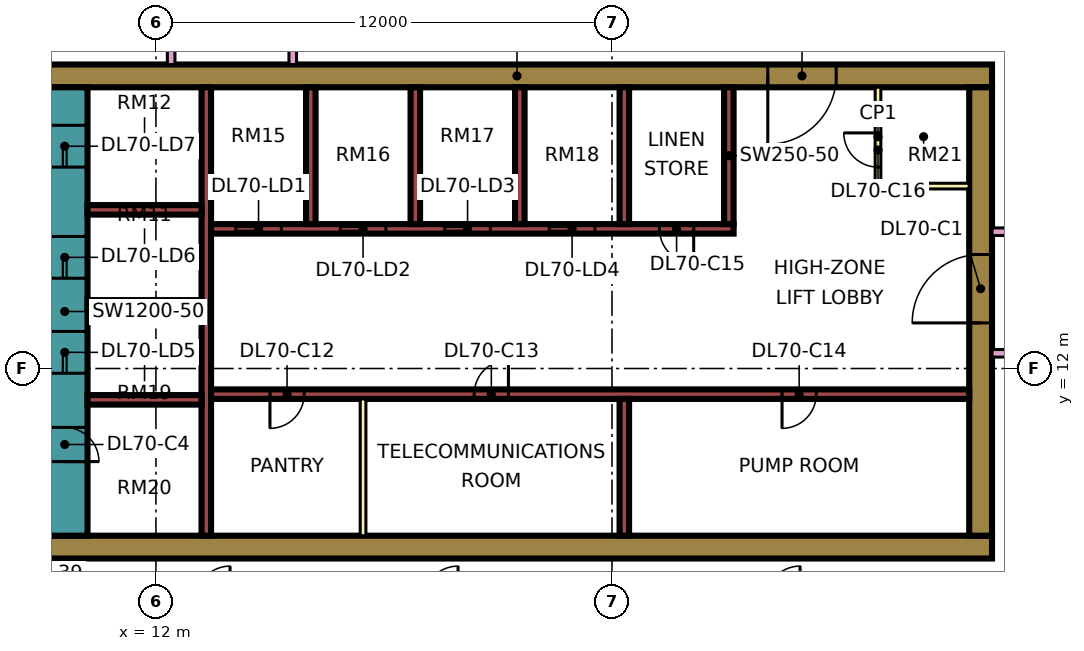
"""IFC4 building model, lengths in metres.
Left out: names, types, materials, properties, quantities, classifications, styles, units other than length and angle.
Written with IfcOpenShell. Run it as: python <this file> out.ifc"""

import sys

from ifc_helpers import new_model, si_unit, direction, frame, frame_2d, origin, place, context, subcontext, project, spatial, rectangle, extrude, element, fill, save


model = new_model("IFC4")
c1 = context("Model", 3, precision=1e-05, world=origin(), true_north=direction((0.0, 1.0)))
c2 = subcontext(c1, "Body", "Model", "MODEL_VIEW")
j1 = project(units=[si_unit("LENGTHUNIT", "METRE"), si_unit("PLANEANGLEUNIT", "RADIAN")], contexts=[c1])
p1 = place(None, origin())
s1 = spatial("IfcSite", under=j1, at=p1, CompositionType="ELEMENT")
p2 = place(p1, origin())
s2 = spatial("IfcBuilding", under=s1, at=p2, CompositionType="ELEMENT")
p3 = place(p2, frame((0.0, 0.0, 299.65)))
s3 = spatial("IfcBuildingStorey", under=s2, at=p3, CompositionType="ELEMENT", Elevation=299.65)
p4 = place(p3, frame((9.0, 7.3, 0.0), z_axis=(0.0, 0.0, 1.0), x_axis=(1.0, 0.0, 0.0)))
e1 = element("IfcWall", 1, at=p4, inside=s3, PredefinedType="SHEAR", context=c2, shape_type="SweptSolid", body=[
    extrude(rectangle(XDim=25.0, YDim=0.6, at=frame_2d((12.5, 0.0))), origin(), (0.0, 0.0, 1.0), 3.75),
])
p5 = place(p3, frame((9.0, 19.7, 0.0), z_axis=(0.0, 0.0, 1.0), x_axis=(1.0, 0.0, 0.0)))
e2 = element("IfcWall", 2, at=p5, inside=s3, PredefinedType="SHEAR", context=c2, shape_type="SweptSolid", body=[
    extrude(rectangle(XDim=25.0, YDim=0.6, at=frame_2d((12.5, 0.0))), origin(), (0.0, 0.0, 1.0), 3.75),
])
p6 = place(p5, frame((19.1, 0.0, 0.0)))
e3 = element("IfcOpeningElement", 3, at=p6, cuts=e2, PredefinedType="OPENING", context=c2, shape_type="SweptSolid", body=[
    extrude(rectangle(XDim=1.8, YDim=2.4, at=frame_2d((0.9, 1.2))), frame((0.0, 0.31, 0.0), z_axis=(0.0, -1.0, 0.0), x_axis=(1.0, 0.0, 0.0)), (0.0, 0.0, 1.0), 0.62),
])
p7 = place(p3, frame((9.6, 7.6, 0.0), z_axis=(0.0, 0.0, 1.0), x_axis=(0.0, 1.0, 0.0)))
e4 = element("IfcWall", 4, at=p7, inside=s3, PredefinedType="SHEAR", context=c2, shape_type="SweptSolid", body=[
    extrude(rectangle(XDim=11.8, YDim=1.2, at=frame_2d((5.9, 0.0))), origin(), (0.0, 0.0, 1.0), 3.75),
])
p8 = place(p7, frame((4.275, 0.0, 0.0)))
e5 = element("IfcOpeningElement", 5, at=p8, cuts=e4, PredefinedType="OPENING", context=c2, shape_type="SweptSolid", body=[
    extrude(rectangle(XDim=1.1, YDim=2.2, at=frame_2d((0.55, 1.1))), frame((0.0, 0.61, 0.0), z_axis=(0.0, -1.0, 0.0), x_axis=(1.0, 0.0, 0.0)), (0.0, 0.0, 1.0), 1.22),
])
p9 = place(p7, frame((6.775, 0.0, 0.0)))
e6 = element("IfcOpeningElement", 6, at=p9, cuts=e4, PredefinedType="OPENING", context=c2, shape_type="SweptSolid", body=[
    extrude(rectangle(XDim=1.1, YDim=2.2, at=frame_2d((0.55, 1.1))), frame((0.0, 0.61, 0.0), z_axis=(0.0, -1.0, 0.0), x_axis=(1.0, 0.0, 0.0)), (0.0, 0.0, 1.0), 1.22),
])
p10 = place(p7, frame((9.7, 0.0, 0.0)))
e7 = element("IfcOpeningElement", 7, at=p10, cuts=e4, PredefinedType="OPENING", context=c2, shape_type="SweptSolid", body=[
    extrude(rectangle(XDim=1.1, YDim=2.2, at=frame_2d((0.55, 1.1))), frame((0.0, 0.61, 0.0), z_axis=(0.0, -1.0, 0.0), x_axis=(1.0, 0.0, 0.0)), (0.0, 0.0, 1.0), 1.22),
])
p11 = place(p7, frame((1.95, 0.0, 0.0)))
e8 = element("IfcOpeningElement", 8, at=p11, cuts=e4, PredefinedType="OPENING", context=c2, shape_type="SweptSolid", body=[
    extrude(rectangle(XDim=0.9, YDim=2.1, at=frame_2d((0.45, 1.05))), frame((0.0, 0.61, 0.0), z_axis=(0.0, -1.0, 0.0), x_axis=(1.0, 0.0, 0.0)), (0.0, 0.0, 1.0), 1.22),
])
p12 = place(p3, frame((33.7, 7.6, 0.0), z_axis=(0.0, 0.0, 1.0), x_axis=(0.0, 1.0, 0.0)))
e9 = element("IfcWall", 9, at=p12, inside=s3, PredefinedType="SHEAR", context=c2, shape_type="SweptSolid", body=[
    extrude(rectangle(XDim=11.8, YDim=0.6, at=frame_2d((5.9, 0.0))), origin(), (0.0, 0.0, 1.0), 3.75),
])
p13 = place(p12, frame((5.6, 0.0, 0.0)))
e10 = element("IfcOpeningElement", 10, at=p13, cuts=e9, PredefinedType="OPENING", context=c2, shape_type="SweptSolid", body=[
    extrude(rectangle(XDim=1.8, YDim=2.4, at=frame_2d((0.9, 1.2))), frame((0.0, 0.31, 0.0), z_axis=(0.0, -1.0, 0.0), x_axis=(1.0, 0.0, 0.0)), (0.0, 0.0, 1.0), 0.62),
])
p14 = place(p3, frame((13.325, 7.6, 0.0), z_axis=(0.0, 0.0, 1.0), x_axis=(0.0, 1.0, 0.0)))
e11 = element("IfcWall", 11, at=p14, inside=s3, PredefinedType="SHEAR", context=c2, shape_type="SweptSolid", body=[
    extrude(rectangle(XDim=11.8, YDim=0.25, at=frame_2d((5.9, 0.0))), origin(), (0.0, 0.0, 1.0), 3.75),
])
p15 = place(p3, frame((13.45, 11.325, 0.0), z_axis=(0.0, 0.0, 1.0), x_axis=(1.0, 0.0, 0.0)))
e12 = element("IfcWall", 12, at=p15, inside=s3, PredefinedType="SHEAR", context=c2, shape_type="SweptSolid", body=[
    extrude(rectangle(XDim=19.95, YDim=0.25, at=frame_2d((9.975, 0.0))), origin(), (0.0, 0.0, 1.0), 3.75),
])
p16 = place(p15, frame((1.55, 0.0, 0.0)))
e13 = element("IfcOpeningElement", 13, at=p16, cuts=e12, PredefinedType="OPENING", context=c2, shape_type="SweptSolid", body=[
    extrude(rectangle(XDim=0.9, YDim=2.1, at=frame_2d((0.45, 1.05))), frame((0.0, 0.135, 0.0), z_axis=(0.0, -1.0, 0.0), x_axis=(1.0, 0.0, 0.0)), (0.0, 0.0, 1.0), 0.27),
])
p17 = place(p15, frame((6.925, 0.0, 0.0)))
e14 = element("IfcOpeningElement", 14, at=p17, cuts=e12, PredefinedType="OPENING", context=c2, shape_type="SweptSolid", body=[
    extrude(rectangle(XDim=0.9, YDim=2.1, at=frame_2d((0.45, 1.05))), frame((0.0, 0.135, 0.0), z_axis=(0.0, -1.0, 0.0), x_axis=(1.0, 0.0, 0.0)), (0.0, 0.0, 1.0), 0.27),
])
p18 = place(p15, frame((15.025, 0.0, 0.0)))
e15 = element("IfcOpeningElement", 15, at=p18, cuts=e12, PredefinedType="OPENING", context=c2, shape_type="SweptSolid", body=[
    extrude(rectangle(XDim=0.9, YDim=2.1, at=frame_2d((0.45, 1.05))), frame((0.0, 0.135, 0.0), z_axis=(0.0, -1.0, 0.0), x_axis=(1.0, 0.0, 0.0)), (0.0, 0.0, 1.0), 0.27),
])
p19 = place(p3, frame((13.45, 15.675, 0.0), z_axis=(0.0, 0.0, 1.0), x_axis=(1.0, 0.0, 0.0)))
e16 = element("IfcWall", 16, at=p19, inside=s3, PredefinedType="SHEAR", context=c2, shape_type="SweptSolid", body=[
    extrude(rectangle(XDim=13.75, YDim=0.25, at=frame_2d((6.875, 0.0))), origin(), (0.0, 0.0, 1.0), 3.75),
])
p20 = place(p19, frame((0.65, 0.0, 0.0)))
e17 = element("IfcOpeningElement", 17, at=p20, cuts=e16, PredefinedType="OPENING", context=c2, shape_type="SweptSolid", body=[
    extrude(rectangle(XDim=1.2, YDim=2.2, at=frame_2d((0.6, 1.1))), frame((0.0, 0.135, 0.0), z_axis=(0.0, -1.0, 0.0), x_axis=(1.0, 0.0, 0.0)), (0.0, 0.0, 1.0), 0.27),
])
p21 = place(p19, frame((3.4, 0.0, 0.0)))
e18 = element("IfcOpeningElement", 18, at=p21, cuts=e16, PredefinedType="OPENING", context=c2, shape_type="SweptSolid", body=[
    extrude(rectangle(XDim=1.2, YDim=2.2, at=frame_2d((0.6, 1.1))), frame((0.0, 0.135, 0.0), z_axis=(0.0, -1.0, 0.0), x_axis=(1.0, 0.0, 0.0)), (0.0, 0.0, 1.0), 0.27),
])
p22 = place(p19, frame((6.15, 0.0, 0.0)))
e19 = element("IfcOpeningElement", 19, at=p22, cuts=e16, PredefinedType="OPENING", context=c2, shape_type="SweptSolid", body=[
    extrude(rectangle(XDim=1.2, YDim=2.2, at=frame_2d((0.6, 1.1))), frame((0.0, 0.135, 0.0), z_axis=(0.0, -1.0, 0.0), x_axis=(1.0, 0.0, 0.0)), (0.0, 0.0, 1.0), 0.27),
])
p23 = place(p19, frame((8.9, 0.0, 0.0)))
e20 = element("IfcOpeningElement", 20, at=p23, cuts=e16, PredefinedType="OPENING", context=c2, shape_type="SweptSolid", body=[
    extrude(rectangle(XDim=1.2, YDim=2.2, at=frame_2d((0.6, 1.1))), frame((0.0, 0.135, 0.0), z_axis=(0.0, -1.0, 0.0), x_axis=(1.0, 0.0, 0.0)), (0.0, 0.0, 1.0), 0.27),
])
p24 = place(p19, frame((11.8, 0.0, 0.0)))
e21 = element("IfcOpeningElement", 21, at=p24, cuts=e16, PredefinedType="OPENING", context=c2, shape_type="SweptSolid", body=[
    extrude(rectangle(XDim=0.9, YDim=2.1, at=frame_2d((0.45, 1.05))), frame((0.0, 0.135, 0.0), z_axis=(0.0, -1.0, 0.0), x_axis=(1.0, 0.0, 0.0)), (0.0, 0.0, 1.0), 0.27),
])
for number, where, z_axis, x_axis in (
    (22, (10.2, 11.175, 0.0), (0.0, 0.0, 1.0), (1.0, 0.0, 0.0)),
    (23, (10.2, 13.675, 0.0), (0.0, 0.0, 1.0), (1.0, 0.0, 0.0)),
    (24, (10.2, 16.175, 0.0), (0.0, 0.0, 1.0), (1.0, 0.0, 0.0)),
):
    element("IfcWall", number, at=place(p3, frame(where, z_axis=z_axis, x_axis=x_axis)), inside=s3, PredefinedType="SHEAR", context=c2, shape_type="SweptSolid", body=[
        extrude(rectangle(XDim=3.0, YDim=0.25, at=frame_2d((1.5, 0.0))), origin(), (0.0, 0.0, 1.0), 3.75),
    ])
for number, where, z_axis, x_axis in (
    (25, (24.325, 7.6, 0.0), (0.0, 0.0, 1.0), (0.0, 1.0, 0.0)),
    (26, (16.075, 15.8, 0.0), (0.0, 0.0, 1.0), (0.0, 1.0, 0.0)),
    (27, (18.825, 15.8, 0.0), (0.0, 0.0, 1.0), (0.0, 1.0, 0.0)),
    (28, (21.575, 15.8, 0.0), (0.0, 0.0, 1.0), (0.0, 1.0, 0.0)),
    (29, (24.325, 15.8, 0.0), (0.0, 0.0, 1.0), (0.0, 1.0, 0.0)),
    (30, (27.075, 15.8, 0.0), (0.0, 0.0, 1.0), (0.0, 1.0, 0.0)),
):
    element("IfcWall", number, at=place(p3, frame(where, z_axis=z_axis, x_axis=x_axis)), inside=s3, PredefinedType="SHEAR", context=c2, shape_type="SweptSolid", body=[
        extrude(rectangle(XDim=3.6, YDim=0.25, at=frame_2d((1.8, 0.0))), origin(), (0.0, 0.0, 1.0), 3.75),
    ])
p25 = place(p3, frame((-1.447, 12.553, 0.0), z_axis=(0.0, 0.0, 1.0), x_axis=(0.707106781187, -0.707106781187, 0.0)))
e31 = element("IfcWall", 31, at=p25, inside=s3, PredefinedType="SOLIDWALL", context=c2, shape_type="SweptSolid", body=[
    extrude(rectangle(XDim=19.799, YDim=0.15, at=frame_2d((9.899, 0.0))), origin(), (0.0, 0.0, 1.0), 3.35),
])
p26 = place(p25, frame((2.212, 0.0, 0.45)))
e32 = element("IfcOpeningElement", 32, at=p26, cuts=e31, PredefinedType="OPENING", context=c2, shape_type="SweptSolid", body=[
    extrude(rectangle(XDim=3.0, YDim=2.4, at=frame_2d((1.5, 1.2))), frame((0.0, 0.085, 0.0), z_axis=(0.0, -1.0, 0.0), x_axis=(1.0, 0.0, 0.0)), (0.0, 0.0, 1.0), 0.17),
])
p27 = place(p25, frame((10.216, 0.0, 0.45)))
e33 = element("IfcOpeningElement", 33, at=p27, cuts=e31, PredefinedType="OPENING", context=c2, shape_type="SweptSolid", body=[
    extrude(rectangle(XDim=3.0, YDim=2.4, at=frame_2d((1.5, 1.2))), frame((0.0, 0.085, 0.0), z_axis=(0.0, -1.0, 0.0), x_axis=(1.0, 0.0, 0.0)), (0.0, 0.0, 1.0), 0.17),
])
p28 = place(p3, frame((17.45, 7.6, 0.0), z_axis=(0.0, 0.0, 1.0), x_axis=(0.0, 1.0, 0.0)))
e34 = element("IfcWall", 34, at=p28, inside=s3, PredefinedType="PARTITIONING", context=c2, shape_type="SweptSolid", body=[
    extrude(rectangle(XDim=3.6, YDim=0.15, at=frame_2d((1.8, 0.0))), origin(), (0.0, 0.0, 1.0), 3.35),
])
p29 = place(p3, frame((31.0, 16.8, 0.0), z_axis=(0.0, 0.0, 1.0), x_axis=(0.0, 1.0, 0.0)))
e35 = element("IfcWall", 35, at=p29, inside=s3, PredefinedType="PARTITIONING", context=c2, shape_type="SweptSolid", body=[
    extrude(rectangle(XDim=2.6, YDim=0.15, at=frame_2d((1.3, 0.0))), origin(), (0.0, 0.0, 1.0), 3.35),
])
p30 = place(p29, frame((0.5, 0.0, 0.0)))
e36 = element("IfcOpeningElement", 36, at=p30, cuts=e35, PredefinedType="OPENING", context=c2, shape_type="SweptSolid", body=[
    extrude(rectangle(XDim=0.9, YDim=2.1, at=frame_2d((0.45, 1.05))), frame((0.0, 0.085, 0.0), z_axis=(0.0, -1.0, 0.0), x_axis=(1.0, 0.0, 0.0)), (0.0, 0.0, 1.0), 0.17),
])
p31 = place(p3, frame((31.0, 16.8, 0.0), z_axis=(0.0, 0.0, 1.0), x_axis=(1.0, 0.0, 0.0)))
e37 = element("IfcWall", 37, at=p31, inside=s3, PredefinedType="PARTITIONING", context=c2, shape_type="SweptSolid", body=[
    extrude(rectangle(XDim=2.4, YDim=0.15, at=frame_2d((1.2, 0.0))), origin(), (0.0, 0.0, 1.0), 3.35),
])
p32 = place(p3, frame((12.4, 20.0, 0.0), z_axis=(0.0, 0.0, 1.0), x_axis=(0.0, 1.0, 0.0)))
e38 = element("IfcWall", 38, at=p32, inside=s3, PredefinedType="PARTITIONING", context=c2, shape_type="SweptSolid", body=[
    extrude(rectangle(XDim=33.926, YDim=0.2, at=frame_2d((16.963, 0.0))), origin(), (0.0, 0.0, 1.0), 3.35),
])
p33 = place(p32, frame((32.1, 0.0, 0.0)))
e39 = element("IfcOpeningElement", 39, at=p33, cuts=e38, PredefinedType="OPENING", context=c2, shape_type="SweptSolid", body=[
    extrude(rectangle(XDim=1.0, YDim=2.1, at=frame_2d((0.5, 1.05))), frame((0.0, 0.11, 0.0), z_axis=(0.0, -1.0, 0.0), x_axis=(1.0, 0.0, 0.0)), (0.0, 0.0, 1.0), 0.22),
])
p34 = place(p32, frame((0.6, 0.0, 0.0)))
e40 = element("IfcOpeningElement", 40, at=p34, cuts=e38, PredefinedType="OPENING", context=c2, shape_type="SweptSolid", body=[
    extrude(rectangle(XDim=1.2, YDim=2.1, at=frame_2d((0.6, 1.05))), frame((0.0, 0.11, 0.0), z_axis=(0.0, -1.0, 0.0), x_axis=(1.0, 0.0, 0.0)), (0.0, 0.0, 1.0), 0.22),
])
p35 = place(p32, frame((14.1, 0.0, 0.0)))
e41 = element("IfcOpeningElement", 41, at=p35, cuts=e38, PredefinedType="OPENING", context=c2, shape_type="SweptSolid", body=[
    extrude(rectangle(XDim=1.0, YDim=2.1, at=frame_2d((0.5, 1.05))), frame((0.0, 0.11, 0.0), z_axis=(0.0, -1.0, 0.0), x_axis=(1.0, 0.0, 0.0)), (0.0, 0.0, 1.0), 0.22),
])
p36 = place(p3, frame((15.6, 20.0, 0.0), z_axis=(0.0, 0.0, 1.0), x_axis=(0.0, 1.0, 0.0)))
e42 = element("IfcWall", 42, at=p36, inside=s3, PredefinedType="PARTITIONING", context=c2, shape_type="SweptSolid", body=[
    extrude(rectangle(XDim=27.775, YDim=0.2, at=frame_2d((13.887, 0.0))), origin(), (0.0, 0.0, 1.0), 3.35),
])
p37 = place(p36, frame((6.55, 0.0, 0.0)))
e43 = element("IfcOpeningElement", 43, at=p37, cuts=e42, PredefinedType="OPENING", context=c2, shape_type="SweptSolid", body=[
    extrude(rectangle(XDim=1.0, YDim=2.1, at=frame_2d((0.5, 1.05))), frame((0.0, 0.11, 0.0), z_axis=(0.0, -1.0, 0.0), x_axis=(1.0, 0.0, 0.0)), (0.0, 0.0, 1.0), 0.22),
])
p38 = place(p36, frame((12.25, 0.0, 0.0)))
e44 = element("IfcOpeningElement", 44, at=p38, cuts=e42, PredefinedType="OPENING", context=c2, shape_type="SweptSolid", body=[
    extrude(rectangle(XDim=1.6, YDim=2.1, at=frame_2d((0.8, 1.05))), frame((0.0, 0.11, 0.0), z_axis=(0.0, -1.0, 0.0), x_axis=(1.0, 0.0, 0.0)), (0.0, 0.0, 1.0), 0.22),
])
p39 = place(p36, frame((17.2, 0.0, 0.0)))
e45 = element("IfcOpeningElement", 45, at=p39, cuts=e42, PredefinedType="OPENING", context=c2, shape_type="SweptSolid", body=[
    extrude(rectangle(XDim=1.0, YDim=2.1, at=frame_2d((0.5, 1.05))), frame((0.0, 0.11, 0.0), z_axis=(0.0, -1.0, 0.0), x_axis=(1.0, 0.0, 0.0)), (0.0, 0.0, 1.0), 0.22),
])
p40 = place(p36, frame((1.15, 0.0, 0.0)))
e46 = element("IfcOpeningElement", 46, at=p40, cuts=e42, PredefinedType="OPENING", context=c2, shape_type="SweptSolid", body=[
    extrude(rectangle(XDim=1.8, YDim=2.1, at=frame_2d((0.9, 1.05))), frame((0.0, 0.11, 0.0), z_axis=(0.0, -1.0, 0.0), x_axis=(1.0, 0.0, 0.0)), (0.0, 0.0, 1.0), 0.22),
])
p41 = place(p36, frame((25.9, 0.0, 0.0)))
e47 = element("IfcOpeningElement", 47, at=p41, cuts=e42, PredefinedType="OPENING", context=c2, shape_type="SweptSolid", body=[
    extrude(rectangle(XDim=1.0, YDim=2.1, at=frame_2d((0.5, 1.05))), frame((0.0, 0.11, 0.0), z_axis=(0.0, -1.0, 0.0), x_axis=(1.0, 0.0, 0.0)), (0.0, 0.0, 1.0), 0.22),
])
p42 = place(p3, frame((34.0, 12.4, 0.0), z_axis=(0.0, 0.0, 1.0), x_axis=(1.0, 0.0, 0.0)))
e48 = element("IfcWall", 48, at=p42, inside=s3, PredefinedType="PARTITIONING", context=c2, shape_type="SweptSolid", body=[
    extrude(rectangle(XDim=2.401, YDim=0.2, at=frame_2d((1.2, 0.0))), origin(), (0.0, 0.0, 1.0), 3.35),
])
p43 = place(p3, frame((34.0, 15.6, 0.0), z_axis=(0.0, 0.0, 1.0), x_axis=(1.0, 0.0, 0.0)))
e49 = element("IfcWall", 49, at=p43, inside=s3, PredefinedType="PARTITIONING", context=c2, shape_type="SweptSolid", body=[
    extrude(rectangle(XDim=10.35, YDim=0.2, at=frame_2d((5.175, 0.0))), origin(), (0.0, 0.0, 1.0), 3.35),
])
p44 = place(p43, frame((5.6, 0.0, 0.0)))
e50 = element("IfcOpeningElement", 50, at=p44, cuts=e49, PredefinedType="OPENING", context=c2, shape_type="SweptSolid", body=[
    extrude(rectangle(XDim=1.0, YDim=2.1, at=frame_2d((0.5, 1.05))), frame((0.0, 0.11, 0.0), z_axis=(0.0, -1.0, 0.0), x_axis=(1.0, 0.0, 0.0)), (0.0, 0.0, 1.0), 0.22),
])
p45 = place(p43, frame((0.45, 0.0, 0.0)))
e51 = element("IfcOpeningElement", 51, at=p45, cuts=e49, PredefinedType="OPENING", context=c2, shape_type="SweptSolid", body=[
    extrude(rectangle(XDim=1.2, YDim=2.1, at=frame_2d((0.6, 1.05))), frame((0.0, 0.11, 0.0), z_axis=(0.0, -1.0, 0.0), x_axis=(1.0, 0.0, 0.0)), (0.0, 0.0, 1.0), 0.22),
])
p46 = place(p20, origin())
e52 = element("IfcDoor", 52, at=p46, inside=s3, OperationType="DOUBLE_DOOR_SLIDING", PredefinedType="DOOR", context=c2, shape_type="SweptSolid", body=[
    extrude(rectangle(XDim=1.2, YDim=2.2, at=frame_2d((0.6, 1.1))), frame((0.0, 0.025, 0.0), z_axis=(0.0, -1.0, 0.0), x_axis=(1.0, 0.0, 0.0)), (0.0, 0.0, 1.0), 0.05),
])
fill(e17, e52)
p47 = place(p21, origin())
e53 = element("IfcDoor", 53, at=p47, inside=s3, OperationType="DOUBLE_DOOR_SLIDING", PredefinedType="DOOR", context=c2, shape_type="SweptSolid", body=[
    extrude(rectangle(XDim=1.2, YDim=2.2, at=frame_2d((0.6, 1.1))), frame((0.0, 0.025, 0.0), z_axis=(0.0, -1.0, 0.0), x_axis=(1.0, 0.0, 0.0)), (0.0, 0.0, 1.0), 0.05),
])
fill(e18, e53)
p48 = place(p22, origin())
e54 = element("IfcDoor", 54, at=p48, inside=s3, OperationType="DOUBLE_DOOR_SLIDING", PredefinedType="DOOR", context=c2, shape_type="SweptSolid", body=[
    extrude(rectangle(XDim=1.2, YDim=2.2, at=frame_2d((0.6, 1.1))), frame((0.0, 0.025, 0.0), z_axis=(0.0, -1.0, 0.0), x_axis=(1.0, 0.0, 0.0)), (0.0, 0.0, 1.0), 0.05),
])
fill(e19, e54)
p49 = place(p23, origin())
e55 = element("IfcDoor", 55, at=p49, inside=s3, OperationType="DOUBLE_DOOR_SLIDING", PredefinedType="DOOR", context=c2, shape_type="SweptSolid", body=[
    extrude(rectangle(XDim=1.2, YDim=2.2, at=frame_2d((0.6, 1.1))), frame((0.0, 0.025, 0.0), z_axis=(0.0, -1.0, 0.0), x_axis=(1.0, 0.0, 0.0)), (0.0, 0.0, 1.0), 0.05),
])
fill(e20, e55)
p50 = place(p8, origin())
e56 = element("IfcDoor", 56, at=p50, inside=s3, OperationType="DOUBLE_DOOR_SLIDING", PredefinedType="DOOR", context=c2, shape_type="SweptSolid", body=[
    extrude(rectangle(XDim=1.1, YDim=2.2, at=frame_2d((0.55, 1.1))), frame((0.0, 0.025, 0.0), z_axis=(0.0, -1.0, 0.0), x_axis=(1.0, 0.0, 0.0)), (0.0, 0.0, 1.0), 0.05),
])
fill(e5, e56)
p51 = place(p9, origin())
e57 = element("IfcDoor", 57, at=p51, inside=s3, OperationType="DOUBLE_DOOR_SLIDING", PredefinedType="DOOR", context=c2, shape_type="SweptSolid", body=[
    extrude(rectangle(XDim=1.1, YDim=2.2, at=frame_2d((0.55, 1.1))), frame((0.0, 0.025, 0.0), z_axis=(0.0, -1.0, 0.0), x_axis=(1.0, 0.0, 0.0)), (0.0, 0.0, 1.0), 0.05),
])
fill(e6, e57)
p52 = place(p10, origin())
e58 = element("IfcDoor", 58, at=p52, inside=s3, OperationType="DOUBLE_DOOR_SLIDING", PredefinedType="DOOR", context=c2, shape_type="SweptSolid", body=[
    extrude(rectangle(XDim=1.1, YDim=2.2, at=frame_2d((0.55, 1.1))), frame((0.0, 0.025, 0.0), z_axis=(0.0, -1.0, 0.0), x_axis=(1.0, 0.0, 0.0)), (0.0, 0.0, 1.0), 0.05),
])
fill(e7, e58)
p53 = place(p13, origin())
e59 = element("IfcDoor", 59, at=p53, inside=s3, OperationType="DOUBLE_DOOR_SINGLE_SWING", PredefinedType="DOOR", context=c2, shape_type="SweptSolid", body=[
    extrude(rectangle(XDim=1.8, YDim=2.4, at=frame_2d((0.9, 1.2))), frame((0.0, 0.025, 0.0), z_axis=(0.0, -1.0, 0.0), x_axis=(1.0, 0.0, 0.0)), (0.0, 0.0, 1.0), 0.05),
])
fill(e10, e59)
p54 = place(p6, frame((1.8, 0.0, 0.0), z_axis=(0.0, 0.0, 1.0), x_axis=(-1.0, 0.0, 0.0)))
e60 = element("IfcDoor", 60, at=p54, inside=s3, OperationType="DOUBLE_DOOR_SINGLE_SWING", PredefinedType="DOOR", context=c2, shape_type="SweptSolid", body=[
    extrude(rectangle(XDim=1.8, YDim=2.4, at=frame_2d((0.9, 1.2))), frame((0.0, 0.025, 0.0), z_axis=(0.0, -1.0, 0.0), x_axis=(1.0, 0.0, 0.0)), (0.0, 0.0, 1.0), 0.05),
])
fill(e3, e60)
p55 = place(p11, frame((0.9, 0.0, 0.0), z_axis=(0.0, 0.0, 1.0), x_axis=(-1.0, 0.0, 0.0)))
e61 = element("IfcDoor", 61, at=p55, inside=s3, OperationType="SINGLE_SWING_LEFT", PredefinedType="DOOR", context=c2, shape_type="SweptSolid", body=[
    extrude(rectangle(XDim=0.9, YDim=2.1, at=frame_2d((0.45, 1.05))), frame((0.0, 0.025, 0.0), z_axis=(0.0, -1.0, 0.0), x_axis=(1.0, 0.0, 0.0)), (0.0, 0.0, 1.0), 0.05),
])
fill(e8, e61)
p56 = place(p16, frame((0.9, 0.0, 0.0), z_axis=(0.0, 0.0, 1.0), x_axis=(-1.0, 0.0, 0.0)))
e62 = element("IfcDoor", 62, at=p56, inside=s3, OperationType="SINGLE_SWING_LEFT", PredefinedType="DOOR", context=c2, shape_type="SweptSolid", body=[
    extrude(rectangle(XDim=0.9, YDim=2.1, at=frame_2d((0.45, 1.05))), frame((0.0, 0.025, 0.0), z_axis=(0.0, -1.0, 0.0), x_axis=(1.0, 0.0, 0.0)), (0.0, 0.0, 1.0), 0.05),
])
fill(e13, e62)
p57 = place(p17, frame((0.9, 0.0, 0.0), z_axis=(0.0, 0.0, 1.0), x_axis=(-1.0, 0.0, 0.0)))
e63 = element("IfcDoor", 63, at=p57, inside=s3, OperationType="SINGLE_SWING_RIGHT", PredefinedType="DOOR", context=c2, shape_type="SweptSolid", body=[
    extrude(rectangle(XDim=0.9, YDim=2.1, at=frame_2d((0.45, 1.05))), frame((0.0, 0.025, 0.0), z_axis=(0.0, -1.0, 0.0), x_axis=(1.0, 0.0, 0.0)), (0.0, 0.0, 1.0), 0.05),
])
fill(e14, e63)
p58 = place(p18, frame((0.9, 0.0, 0.0), z_axis=(0.0, 0.0, 1.0), x_axis=(-1.0, 0.0, 0.0)))
e64 = element("IfcDoor", 64, at=p58, inside=s3, OperationType="SINGLE_SWING_LEFT", PredefinedType="DOOR", context=c2, shape_type="SweptSolid", body=[
    extrude(rectangle(XDim=0.9, YDim=2.1, at=frame_2d((0.45, 1.05))), frame((0.0, 0.025, 0.0), z_axis=(0.0, -1.0, 0.0), x_axis=(1.0, 0.0, 0.0)), (0.0, 0.0, 1.0), 0.05),
])
fill(e15, e64)
p59 = place(p24, origin())
e65 = element("IfcDoor", 65, at=p59, inside=s3, OperationType="SINGLE_SWING_RIGHT", PredefinedType="DOOR", context=c2, shape_type="SweptSolid", body=[
    extrude(rectangle(XDim=0.9, YDim=2.1, at=frame_2d((0.45, 1.05))), frame((0.0, 0.025, 0.0), z_axis=(0.0, -1.0, 0.0), x_axis=(1.0, 0.0, 0.0)), (0.0, 0.0, 1.0), 0.05),
])
fill(e21, e65)
p60 = place(p30, frame((0.9, 0.0, 0.0), z_axis=(0.0, 0.0, 1.0), x_axis=(-1.0, 0.0, 0.0)))
e66 = element("IfcDoor", 66, at=p60, inside=s3, OperationType="SINGLE_SWING_RIGHT", PredefinedType="DOOR", context=c2, shape_type="SweptSolid", body=[
    extrude(rectangle(XDim=0.9, YDim=2.1, at=frame_2d((0.45, 1.05))), frame((0.0, 0.025, 0.0), z_axis=(0.0, -1.0, 0.0), x_axis=(1.0, 0.0, 0.0)), (0.0, 0.0, 1.0), 0.05),
])
fill(e36, e66)
save(model, sys.argv[1])
